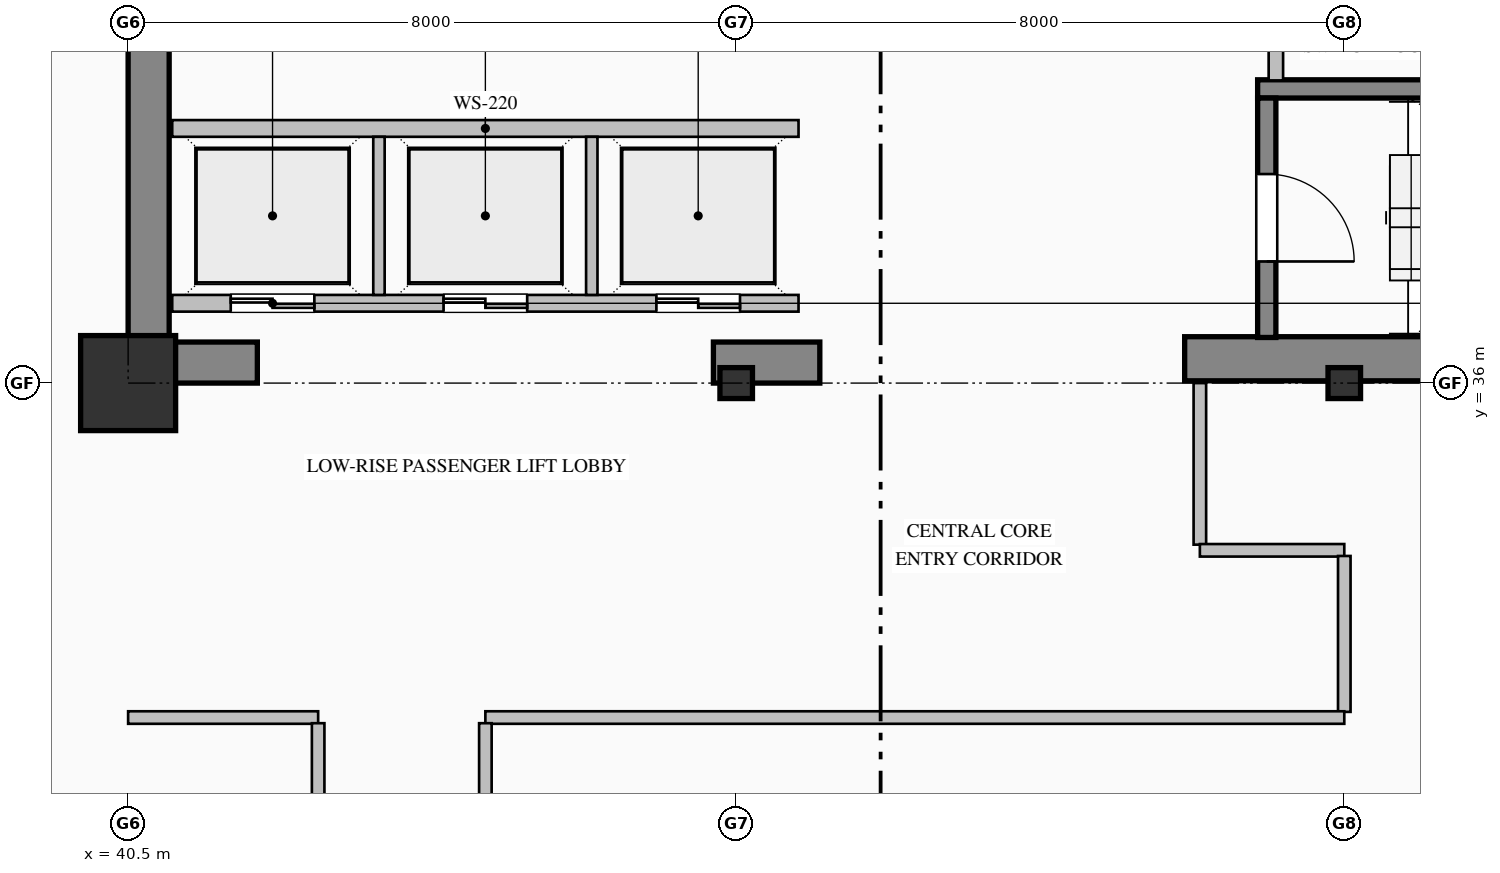
"""IFC4 building model, lengths in metres.
Left out: names, types, materials, properties, quantities, classifications, styles, units other than length and angle.
Written with IfcOpenShell. Run it as: python <this file> out.ifc"""

import sys

from ifc_helpers import new_model, si_unit, direction, frame, frame_2d, origin, origin_2d, place, context, subcontext, project, spatial, rectangle, hollow_rectangle, i_section, extrude, element, fill, save


model = new_model("IFC4")
c1 = context("Model", 3, precision=1e-05, world=origin(), true_north=direction((0.0, 1.0)))
c2 = subcontext(c1, "Body", "Model", "MODEL_VIEW")
j1 = project(units=[si_unit("LENGTHUNIT", "METRE"), si_unit("PLANEANGLEUNIT", "RADIAN")], contexts=[c1])
p1 = place(None, origin())
s1 = spatial("IfcSite", under=j1, at=p1, CompositionType="ELEMENT")
p2 = place(p1, origin())
s2 = spatial("IfcBuilding", under=s1, at=p2, CompositionType="ELEMENT")
p3 = place(p2, frame((0.0, 0.0, 48.2)))
s3 = spatial("IfcBuildingStorey", under=s2, at=p3, CompositionType="ELEMENT", Elevation=48.2)
p4 = place(p3, frame((40.77, 36.54, 0.0), z_axis=(0.0, 0.0, 1.0), x_axis=(0.0, 1.0, 0.0)))
e1 = element("IfcWall", 1, at=p4, inside=s3, PredefinedType="SHEAR", context=c2, shape_type="SweptSolid", body=[
    extrude(rectangle(XDim=7.86, YDim=0.54, at=frame_2d((3.93, 0.0))), origin(), (0.0, 0.0, 1.0), 3.75),
])
p5 = place(p3, frame((40.5, 36.27, 0.0), z_axis=(0.0, 0.0, 1.0), x_axis=(1.0, 0.0, 0.0)))
e2 = element("IfcWall", 2, at=p5, inside=s3, PredefinedType="SHEAR", context=c2, shape_type="SweptSolid", body=[
    extrude(rectangle(XDim=1.7, YDim=0.54, at=frame_2d((0.85, 0.0))), origin(), (0.0, 0.0, 1.0), 3.75),
])
p6 = place(p3, frame((48.2, 36.27, 0.0), z_axis=(0.0, 0.0, 1.0), x_axis=(1.0, 0.0, 0.0)))
e3 = element("IfcWall", 3, at=p6, inside=s3, PredefinedType="SHEAR", context=c2, shape_type="SweptSolid", body=[
    extrude(rectangle(XDim=1.4, YDim=0.54, at=frame_2d((0.7, 0.0))), origin(), (0.0, 0.0, 1.0), 3.75),
])
p7 = place(p3, frame((54.4, 36.32, 0.0), z_axis=(0.0, 0.0, 1.0), x_axis=(1.0, 0.0, 0.0)))
e4 = element("IfcWall", 4, at=p7, inside=s3, PredefinedType="SHEAR", context=c2, shape_type="SweptSolid", body=[
    extrude(rectangle(XDim=9.6, YDim=0.58, at=frame_2d((4.8, 0.0))), origin(), (0.0, 0.0, 1.0), 4.0),
])
p8 = place(p3, frame((40.5, 36.0, 0.0), z_axis=(0.0, 0.0, 1.0), x_axis=(1.0, 0.0, 0.0)))
e5 = element("IfcColumn", 5, at=p8, inside=s3, PredefinedType="COLUMN", context=c2, shape_type="SweptSolid", body=[
    extrude(hollow_rectangle(XDim=1.25, YDim=1.25, WallThickness=0.045, at=origin_2d()), origin(), (0.0, 0.0, 1.0), 4.0),
])
for number, where, z_axis, x_axis in (
    (6, (48.5, 36.0, 0.0), (0.0, 0.0, 1.0), (1.0, 0.0, 0.0)),
    (7, (56.5, 36.0, 0.0), (0.0, 0.0, 1.0), (1.0, 0.0, 0.0)),
):
    element("IfcColumn", number, at=place(p3, frame(where, z_axis=z_axis, x_axis=x_axis)), inside=s3, PredefinedType="COLUMN", context=c2, shape_type="SweptSolid", body=[
        extrude(i_section(OverallWidth=0.407, OverallDepth=0.428, WebThickness=0.02, FlangeThickness=0.035, FilletRadius=0.022, at=origin_2d()), origin(), (0.0, 0.0, 1.0), 4.0),
    ])
p9 = place(p3, frame((55.36, 39.87, 0.0), z_axis=(0.0, 0.0, 1.0), x_axis=(1.0, 0.0, 0.0)))
e8 = element("IfcWall", 8, at=p9, inside=s3, PredefinedType="SOLIDWALL", context=c2, shape_type="SweptSolid", body=[
    extrude(rectangle(XDim=8.08, YDim=0.24, at=frame_2d((4.04, 0.0))), origin(), (0.0, 0.0, 1.0), 4.0),
])
p10 = place(p3, frame((55.48, 39.75, 0.0), z_axis=(0.0, 0.0, 1.0), x_axis=(0.0, -1.0, 0.0)))
e9 = element("IfcWall", 9, at=p10, inside=s3, PredefinedType="SOLIDWALL", context=c2, shape_type="SweptSolid", body=[
    extrude(rectangle(XDim=3.15, YDim=0.24, at=frame_2d((1.575, 0.0))), origin(), (0.0, 0.0, 1.0), 4.0),
])
p11 = place(p10, frame((1.0, 0.0, 0.0)))
e10 = element("IfcOpeningElement", 10, at=p11, cuts=e9, PredefinedType="OPENING", context=c2, shape_type="SweptSolid", body=[
    extrude(rectangle(XDim=1.15, YDim=2.2, at=frame_2d((0.575, 1.1))), frame((0.0, 0.13, 0.0), z_axis=(0.0, -1.0, 0.0), x_axis=(1.0, 0.0, 0.0)), (0.0, 0.0, 1.0), 0.26),
])
p12 = place(p3, frame((49.32, 37.05, 0.0), z_axis=(0.0, 0.0, 1.0), x_axis=(-1.0, 0.0, 0.0)))
e11 = element("IfcWall", 11, at=p12, inside=s3, PredefinedType="PARTITIONING", context=c2, shape_type="SweptSolid", body=[
    extrude(rectangle(XDim=8.24, YDim=0.22, at=frame_2d((4.12, 0.0))), origin(), (0.0, 0.0, 1.0), 3.75),
])
p13 = place(p12, frame((6.37, 0.0, 0.0)))
e12 = element("IfcOpeningElement", 12, at=p13, cuts=e11, PredefinedType="OPENING", context=c2, shape_type="SweptSolid", body=[
    extrude(rectangle(XDim=1.1, YDim=2.2, at=frame_2d((0.55, 1.1))), frame((0.0, 0.12, 0.0), z_axis=(0.0, -1.0, 0.0), x_axis=(1.0, 0.0, 0.0)), (0.0, 0.0, 1.0), 0.24),
])
p14 = place(p12, frame((3.57, 0.0, 0.0)))
e13 = element("IfcOpeningElement", 13, at=p14, cuts=e11, PredefinedType="OPENING", context=c2, shape_type="SweptSolid", body=[
    extrude(rectangle(XDim=1.1, YDim=2.2, at=frame_2d((0.55, 1.1))), frame((0.0, 0.12, 0.0), z_axis=(0.0, -1.0, 0.0), x_axis=(1.0, 0.0, 0.0)), (0.0, 0.0, 1.0), 0.24),
])
p15 = place(p12, frame((0.77, 0.0, 0.0)))
e14 = element("IfcOpeningElement", 14, at=p15, cuts=e11, PredefinedType="OPENING", context=c2, shape_type="SweptSolid", body=[
    extrude(rectangle(XDim=1.1, YDim=2.2, at=frame_2d((0.55, 1.1))), frame((0.0, 0.12, 0.0), z_axis=(0.0, -1.0, 0.0), x_axis=(1.0, 0.0, 0.0)), (0.0, 0.0, 1.0), 0.24),
])
p16 = place(p3, frame((41.08, 39.35, 0.0), z_axis=(0.0, 0.0, 1.0), x_axis=(1.0, 0.0, 0.0)))
e15 = element("IfcWall", 15, at=p16, inside=s3, PredefinedType="PARTITIONING", context=c2, shape_type="SweptSolid", body=[
    extrude(rectangle(XDim=8.24, YDim=0.22, at=frame_2d((4.12, 0.0))), origin(), (0.0, 0.0, 1.0), 3.75),
])
for number, where, z_axis, x_axis in (
    (16, (43.8, 37.16, 0.0), (0.0, 0.0, 1.0), (0.0, 1.0, 0.0)),
    (17, (46.6, 37.16, 0.0), (0.0, 0.0, 1.0), (0.0, 1.0, 0.0)),
):
    element("IfcWall", number, at=place(p3, frame(where, z_axis=z_axis, x_axis=x_axis)), inside=s3, PredefinedType="PARTITIONING", context=c2, shape_type="SweptSolid", body=[
        extrude(rectangle(XDim=2.08, YDim=0.15, at=frame_2d((1.04, 0.0))), origin(), (0.0, 0.0, 1.0), 3.75),
    ])
p17 = place(p3, frame((55.6, 42.713, 0.0), z_axis=(0.0, 0.0, 1.0), x_axis=(0.0, -1.0, 0.0)))
e18 = element("IfcWall", 18, at=p17, inside=s3, PredefinedType="PARTITIONING", context=c2, shape_type="SweptSolid", body=[
    extrude(rectangle(XDim=2.731, YDim=0.19, at=frame_2d((1.365, 0.0))), origin(), (0.0, 0.0, 1.0), 3.75),
])
p18 = place(p3, frame((54.6, 36.0, 0.0), z_axis=(0.0, 0.0, 1.0), x_axis=(0.0, -1.0, 0.0)))
e19 = element("IfcWall", 19, at=p18, inside=s3, PredefinedType="PARTITIONING", context=c2, shape_type="SweptSolid", body=[
    extrude(rectangle(XDim=2.125, YDim=0.165, at=frame_2d((1.063, 0.0))), origin(), (0.0, 0.0, 1.0), 3.75),
])
p19 = place(p3, frame((54.6, 33.8, 0.0), z_axis=(0.0, 0.0, 1.0), x_axis=(1.0, 0.0, 0.0)))
e20 = element("IfcWall", 20, at=p19, inside=s3, PredefinedType="PARTITIONING", context=c2, shape_type="SweptSolid", body=[
    extrude(rectangle(XDim=1.9, YDim=0.165, at=frame_2d((0.95, 0.0))), origin(), (0.0, 0.0, 1.0), 3.75),
])
p20 = place(p3, frame((56.5, 33.726, 0.0), z_axis=(0.0, 0.0, 1.0), x_axis=(0.0, -1.0, 0.0)))
e21 = element("IfcWall", 21, at=p20, inside=s3, PredefinedType="PARTITIONING", context=c2, shape_type="SweptSolid", body=[
    extrude(rectangle(XDim=2.051, YDim=0.165, at=frame_2d((1.025, 0.0))), origin(), (0.0, 0.0, 1.0), 3.042),
])
p21 = place(p3, frame((56.5, 31.6, 0.0), z_axis=(0.0, 0.0, 1.0), x_axis=(-1.0, 0.0, 0.0)))
e22 = element("IfcWall", 22, at=p21, inside=s3, PredefinedType="PARTITIONING", context=c2, shape_type="SweptSolid", body=[
    extrude(rectangle(XDim=11.3, YDim=0.165, at=frame_2d((5.65, 0.0))), origin(), (0.0, 0.0, 1.0), 3.75),
])
p22 = place(p3, frame((43.0, 31.6, 0.0), z_axis=(0.0, 0.0, 1.0), x_axis=(-1.0, 0.0, 0.0)))
e23 = element("IfcWall", 23, at=p22, inside=s3, PredefinedType="PARTITIONING", context=c2, shape_type="SweptSolid", body=[
    extrude(rectangle(XDim=2.5, YDim=0.165, at=frame_2d((1.25, 0.0))), origin(), (0.0, 0.0, 1.0), 3.75),
])
p23 = place(p3, frame((45.2, 31.525, 0.0), z_axis=(0.0, 0.0, 1.0), x_axis=(0.0, -1.0, 0.0)))
e24 = element("IfcWall", 24, at=p23, inside=s3, PredefinedType="PARTITIONING", context=c2, shape_type="SweptSolid", body=[
    extrude(rectangle(XDim=16.751, YDim=0.165, at=frame_2d((8.375, 0.0))), origin(), (0.0, 0.0, 1.0), 3.75),
])
p24 = place(p23, frame((7.875, 0.0, 0.0)))
e25 = element("IfcOpeningElement", 25, at=p24, cuts=e24, PredefinedType="OPENING", context=c2, shape_type="SweptSolid", body=[
    extrude(rectangle(XDim=1.0, YDim=2.15, at=frame_2d((0.5, 1.075))), frame((0.0, 0.093, 0.0), z_axis=(0.0, -1.0, 0.0), x_axis=(1.0, 0.0, 0.0)), (0.0, 0.0, 1.0), 0.185),
])
p25 = place(p3, frame((43.0, 12.574, 0.0), z_axis=(0.0, 0.0, 1.0), x_axis=(0.0, 1.0, 0.0)))
e26 = element("IfcWall", 26, at=p25, inside=s3, PredefinedType="PARTITIONING", context=c2, shape_type="SweptSolid", body=[
    extrude(rectangle(XDim=18.951, YDim=0.165, at=frame_2d((9.476, 0.0))), origin(), (0.0, 0.0, 1.0), 3.75),
])
p26 = place(p25, frame((8.976, 0.0, 0.0)))
e27 = element("IfcOpeningElement", 27, at=p26, cuts=e26, PredefinedType="OPENING", context=c2, shape_type="SweptSolid", body=[
    extrude(rectangle(XDim=1.0, YDim=2.15, at=frame_2d((0.5, 1.075))), frame((0.0, 0.093, 0.0), z_axis=(0.0, -1.0, 0.0), x_axis=(1.0, 0.0, 0.0)), (0.0, 0.0, 1.0), 0.185),
])
p27 = place(p11, origin())
e28 = element("IfcDoor", 28, at=p27, inside=s3, OperationType="SINGLE_SWING_RIGHT", PredefinedType="DOOR", context=c2, shape_type="SweptSolid", body=[
    extrude(rectangle(XDim=1.15, YDim=2.2, at=frame_2d((0.575, 1.1))), frame((0.0, 0.025, 0.0), z_axis=(0.0, -1.0, 0.0), x_axis=(1.0, 0.0, 0.0)), (0.0, 0.0, 1.0), 0.05),
])
fill(e10, e28)
p28 = place(p13, origin())
e29 = element("IfcDoor", 29, at=p28, inside=s3, OperationType="DOUBLE_DOOR_SLIDING", PredefinedType="DOOR", context=c2, shape_type="SweptSolid", body=[
    extrude(rectangle(XDim=1.1, YDim=2.2, at=frame_2d((0.55, 1.1))), frame((0.0, 0.025, 0.0), z_axis=(0.0, -1.0, 0.0), x_axis=(1.0, 0.0, 0.0)), (0.0, 0.0, 1.0), 0.05),
])
fill(e12, e29)
p29 = place(p14, origin())
e30 = element("IfcDoor", 30, at=p29, inside=s3, OperationType="DOUBLE_DOOR_SLIDING", PredefinedType="DOOR", context=c2, shape_type="SweptSolid", body=[
    extrude(rectangle(XDim=1.1, YDim=2.2, at=frame_2d((0.55, 1.1))), frame((0.0, 0.025, 0.0), z_axis=(0.0, -1.0, 0.0), x_axis=(1.0, 0.0, 0.0)), (0.0, 0.0, 1.0), 0.05),
])
fill(e13, e30)
p30 = place(p15, origin())
e31 = element("IfcDoor", 31, at=p30, inside=s3, OperationType="DOUBLE_DOOR_SLIDING", PredefinedType="DOOR", context=c2, shape_type="SweptSolid", body=[
    extrude(rectangle(XDim=1.1, YDim=2.2, at=frame_2d((0.55, 1.1))), frame((0.0, 0.025, 0.0), z_axis=(0.0, -1.0, 0.0), x_axis=(1.0, 0.0, 0.0)), (0.0, 0.0, 1.0), 0.05),
])
fill(e14, e31)
save(model, sys.argv[1])
